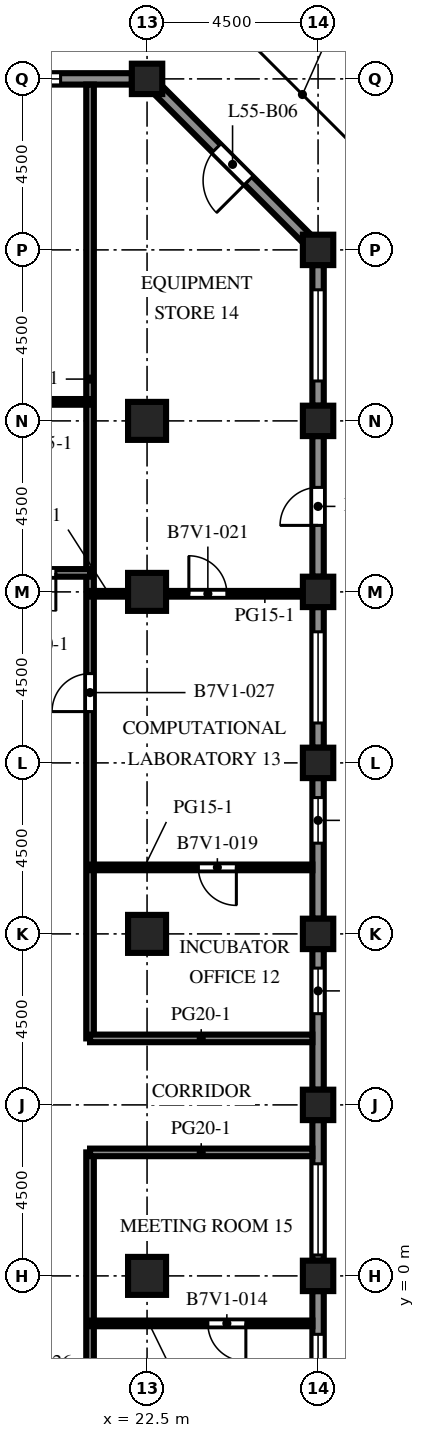
"""IFC4 building model, lengths in metres.
Left out: names, types, materials, properties, quantities, classifications, styles, units other than length and angle.
Written with IfcOpenShell. Run it as: python <this file> out.ifc"""

import sys

from ifc_helpers import new_model, si_unit, direction, frame, frame_2d, origin, origin_2d, place, context, subcontext, project, spatial, rectangle, extrude, element, fill, save


model = new_model("IFC4")
c1 = context("Model", 3, precision=1e-05, world=origin(), true_north=direction((0.0, 1.0)))
c2 = subcontext(c1, "Body", "Model", "MODEL_VIEW")
j1 = project(units=[si_unit("LENGTHUNIT", "METRE"), si_unit("PLANEANGLEUNIT", "RADIAN")], contexts=[c1])
p1 = place(None, origin())
s1 = spatial("IfcSite", under=j1, at=p1, CompositionType="ELEMENT")
p2 = place(p1, origin())
s2 = spatial("IfcBuilding", under=s1, at=p2, CompositionType="ELEMENT")
p3 = place(p2, frame((0.0, 0.0, 243.9)))
s3 = spatial("IfcBuildingStorey", under=s2, at=p3, CompositionType="ELEMENT", Elevation=243.9)
for number, where, z_axis, x_axis in (
    (1, (22.5, 31.5, 0.0), (0.0, 0.0, 1.0), (1.0, 0.0, 0.0)),
    (2, (27.0, 0.0, 0.0), (0.0, 0.0, 1.0), (1.0, 0.0, 0.0)),
    (3, (27.0, 4.5, 0.0), (0.0, 0.0, 1.0), (1.0, 0.0, 0.0)),
    (4, (27.0, 9.0, 0.0), (0.0, 0.0, 1.0), (1.0, 0.0, 0.0)),
    (5, (27.0, 13.5, 0.0), (0.0, 0.0, 1.0), (1.0, 0.0, 0.0)),
    (6, (27.0, 18.0, 0.0), (0.0, 0.0, 1.0), (1.0, 0.0, 0.0)),
    (7, (27.0, 22.5, 0.0), (0.0, 0.0, 1.0), (1.0, 0.0, 0.0)),
    (8, (27.0, 27.0, 0.0), (0.0, 0.0, 1.0), (1.0, 0.0, 0.0)),
):
    element("IfcColumn", number, at=place(p3, frame(where, z_axis=z_axis, x_axis=x_axis)), inside=s3, PredefinedType="COLUMN", context=c2, shape_type="SweptSolid", body=[
        extrude(rectangle(XDim=0.8, YDim=0.8, at=origin_2d()), origin(), (0.0, 0.0, 1.0), 4.1),
    ])
for number, where, z_axis, x_axis in (
    (9, (22.5, 0.0, 0.0), (0.0, 0.0, 1.0), (1.0, 0.0, 0.0)),
    (10, (22.5, 9.0, 0.0), (0.0, 0.0, 1.0), (1.0, 0.0, 0.0)),
    (11, (22.5, 18.0, 0.0), (0.0, 0.0, 1.0), (1.0, 0.0, 0.0)),
    (12, (22.5, 22.5, 0.0), (0.0, 0.0, 1.0), (1.0, 0.0, 0.0)),
):
    element("IfcColumn", number, at=place(p3, frame(where, z_axis=z_axis, x_axis=x_axis)), inside=s3, PredefinedType="COLUMN", context=c2, shape_type="SweptSolid", body=[
        extrude(rectangle(XDim=1.0, YDim=1.0, at=origin_2d()), origin(), (0.0, 0.0, 1.0), 4.1),
    ])
p4 = place(p3, frame((27.0, -0.4, 0.0), z_axis=(0.0, 0.0, 1.0), x_axis=(0.0, -1.0, 0.0)))
e13 = element("IfcWall", 13, at=p4, inside=s3, PredefinedType="SOLIDWALL", context=c2, shape_type="SweptSolid", body=[
    extrude(rectangle(XDim=3.7, YDim=0.3, at=frame_2d((1.85, 0.0))), origin(), (0.0, 0.0, 1.0), 2.85),
])
p5 = place(p4, frame((1.137, 0.0, 0.8)))
e14 = element("IfcOpeningElement", 14, at=p5, cuts=e13, PredefinedType="OPENING", context=c2, shape_type="SweptSolid", body=[
    extrude(rectangle(XDim=2.4, YDim=1.7, at=frame_2d((1.2, 0.85))), frame((0.0, 0.16, 0.0), z_axis=(0.0, -1.0, 0.0), x_axis=(1.0, 0.0, 0.0)), (0.0, 0.0, 1.0), 0.32),
])
p6 = place(p3, frame((27.0, 4.1, 0.0), z_axis=(0.0, 0.0, 1.0), x_axis=(0.0, -1.0, 0.0)))
e15 = element("IfcWall", 15, at=p6, inside=s3, PredefinedType="SOLIDWALL", context=c2, shape_type="SweptSolid", body=[
    extrude(rectangle(XDim=3.7, YDim=0.3, at=frame_2d((1.85, 0.0))), origin(), (0.0, 0.0, 1.0), 2.85),
])
p7 = place(p6, frame((1.15, 0.0, 0.8)))
e16 = element("IfcOpeningElement", 16, at=p7, cuts=e15, PredefinedType="OPENING", context=c2, shape_type="SweptSolid", body=[
    extrude(rectangle(XDim=2.4, YDim=1.7, at=frame_2d((1.2, 0.85))), frame((0.0, 0.16, 0.0), z_axis=(0.0, -1.0, 0.0), x_axis=(1.0, 0.0, 0.0)), (0.0, 0.0, 1.0), 0.32),
])
p8 = place(p3, frame((27.0, 8.6, 0.0), z_axis=(0.0, 0.0, 1.0), x_axis=(0.0, -1.0, 0.0)))
e17 = element("IfcWall", 17, at=p8, inside=s3, PredefinedType="SOLIDWALL", context=c2, shape_type="SweptSolid", body=[
    extrude(rectangle(XDim=3.7, YDim=0.3, at=frame_2d((1.85, 0.0))), origin(), (0.0, 0.0, 1.0), 2.85),
])
p9 = place(p8, frame((0.5, 0.0, 0.8)))
e18 = element("IfcOpeningElement", 18, at=p9, cuts=e17, PredefinedType="OPENING", context=c2, shape_type="SweptSolid", body=[
    extrude(rectangle(XDim=1.2, YDim=1.7, at=frame_2d((0.6, 0.85))), frame((0.0, 0.16, 0.0), z_axis=(0.0, -1.0, 0.0), x_axis=(1.0, 0.0, 0.0)), (0.0, 0.0, 1.0), 0.32),
])
p10 = place(p3, frame((27.0, 13.1, 0.0), z_axis=(0.0, 0.0, 1.0), x_axis=(0.0, -1.0, 0.0)))
e19 = element("IfcWall", 19, at=p10, inside=s3, PredefinedType="SOLIDWALL", context=c2, shape_type="SweptSolid", body=[
    extrude(rectangle(XDim=3.7, YDim=0.3, at=frame_2d((1.85, 0.0))), origin(), (0.0, 0.0, 1.0), 2.85),
])
p11 = place(p10, frame((0.512, 0.0, 0.8)))
e20 = element("IfcOpeningElement", 20, at=p11, cuts=e19, PredefinedType="OPENING", context=c2, shape_type="SweptSolid", body=[
    extrude(rectangle(XDim=1.2, YDim=1.7, at=frame_2d((0.6, 0.85))), frame((0.0, 0.16, 0.0), z_axis=(0.0, -1.0, 0.0), x_axis=(1.0, 0.0, 0.0)), (0.0, 0.0, 1.0), 0.32),
])
p12 = place(p3, frame((27.0, 17.6, 0.0), z_axis=(0.0, 0.0, 1.0), x_axis=(0.0, -1.0, 0.0)))
e21 = element("IfcWall", 21, at=p12, inside=s3, PredefinedType="SOLIDWALL", context=c2, shape_type="SweptSolid", body=[
    extrude(rectangle(XDim=3.7, YDim=0.3, at=frame_2d((1.85, 0.0))), origin(), (0.0, 0.0, 1.0), 2.85),
])
p13 = place(p12, frame((0.65, 0.0, 0.8)))
e22 = element("IfcOpeningElement", 22, at=p13, cuts=e21, PredefinedType="OPENING", context=c2, shape_type="SweptSolid", body=[
    extrude(rectangle(XDim=2.4, YDim=1.7, at=frame_2d((1.2, 0.85))), frame((0.0, 0.16, 0.0), z_axis=(0.0, -1.0, 0.0), x_axis=(1.0, 0.0, 0.0)), (0.0, 0.0, 1.0), 0.32),
])
p14 = place(p3, frame((27.0, 22.1, 0.0), z_axis=(0.0, 0.0, 1.0), x_axis=(0.0, -1.0, 0.0)))
e23 = element("IfcWall", 23, at=p14, inside=s3, PredefinedType="SOLIDWALL", context=c2, shape_type="SweptSolid", body=[
    extrude(rectangle(XDim=3.7, YDim=0.3, at=frame_2d((1.85, 0.0))), origin(), (0.0, 0.0, 1.0), 2.85),
])
p15 = place(p14, frame((1.35, 0.0, 0.0)))
e24 = element("IfcOpeningElement", 24, at=p15, cuts=e23, PredefinedType="OPENING", context=c2, shape_type="SweptSolid", body=[
    extrude(rectangle(XDim=1.0, YDim=2.2, at=frame_2d((0.5, 1.1))), frame((0.0, 0.16, 0.0), z_axis=(0.0, -1.0, 0.0), x_axis=(1.0, 0.0, 0.0)), (0.0, 0.0, 1.0), 0.32),
])
p16 = place(p3, frame((27.0, 26.6, 0.0), z_axis=(0.0, 0.0, 1.0), x_axis=(0.0, -1.0, 0.0)))
e25 = element("IfcWall", 25, at=p16, inside=s3, PredefinedType="SOLIDWALL", context=c2, shape_type="SweptSolid", body=[
    extrude(rectangle(XDim=3.7, YDim=0.3, at=frame_2d((1.85, 0.0))), origin(), (0.0, 0.0, 1.0), 2.85),
])
p17 = place(p16, frame((0.65, 0.0, 0.8)))
e26 = element("IfcOpeningElement", 26, at=p17, cuts=e25, PredefinedType="OPENING", context=c2, shape_type="SweptSolid", body=[
    extrude(rectangle(XDim=2.4, YDim=1.7, at=frame_2d((1.2, 0.85))), frame((0.0, 0.16, 0.0), z_axis=(0.0, -1.0, 0.0), x_axis=(1.0, 0.0, 0.0)), (0.0, 0.0, 1.0), 0.32),
])
p18 = place(p3, frame((22.794, 31.206, 0.0), z_axis=(0.0, 0.0, 1.0), x_axis=(0.707106781187, -0.707106781187, 0.0)))
e27 = element("IfcWall", 27, at=p18, inside=s3, PredefinedType="SOLIDWALL", context=c2, shape_type="SweptSolid", body=[
    extrude(rectangle(XDim=5.532, YDim=0.3, at=frame_2d((2.766, 0.0))), origin(), (0.0, 0.0, 1.0), 2.85),
])
p19 = place(p18, frame((2.166, 0.0, 0.0)))
e28 = element("IfcOpeningElement", 28, at=p19, cuts=e27, PredefinedType="OPENING", context=c2, shape_type="SweptSolid", body=[
    extrude(rectangle(XDim=1.2, YDim=2.2, at=frame_2d((0.6, 1.1))), frame((0.0, 0.16, 0.0), z_axis=(0.0, -1.0, 0.0), x_axis=(1.0, 0.0, 0.0)), (0.0, 0.0, 1.0), 0.32),
])
p20 = place(p3, frame((18.4, 31.5, 0.0), z_axis=(0.0, 0.0, 1.0), x_axis=(1.0, 0.0, 0.0)))
e29 = element("IfcWall", 29, at=p20, inside=s3, PredefinedType="SOLIDWALL", context=c2, shape_type="SweptSolid", body=[
    extrude(rectangle(XDim=3.7, YDim=0.3, at=frame_2d((1.85, 0.0))), origin(), (0.0, 0.0, 1.0), 2.85),
])
p21 = place(p20, frame((0.625, 0.0, 0.8)))
e30 = element("IfcOpeningElement", 30, at=p21, cuts=e29, PredefinedType="OPENING", context=c2, shape_type="SweptSolid", body=[
    extrude(rectangle(XDim=1.2, YDim=1.7, at=frame_2d((0.6, 0.85))), frame((0.0, 0.16, 0.0), z_axis=(0.0, -1.0, 0.0), x_axis=(1.0, 0.0, 0.0)), (0.0, 0.0, 1.0), 0.32),
])
p22 = place(p3, frame((21.0, 3.25, 0.0), z_axis=(0.0, 0.0, 1.0), x_axis=(0.0, -1.0, 0.0)))
e31 = element("IfcWall", 31, at=p22, inside=s3, PredefinedType="PARTITIONING", context=c2, shape_type="SweptSolid", body=[
    extrude(rectangle(XDim=25.6, YDim=0.2, at=frame_2d((12.8, 0.0))), origin(), (0.0, 0.0, 1.0), 3.65),
])
p23 = place(p22, frame((6.6, 0.0, 0.0)))
e32 = element("IfcOpeningElement", 32, at=p23, cuts=e31, PredefinedType="OPENING", context=c2, shape_type="SweptSolid", body=[
    extrude(rectangle(XDim=1.0, YDim=2.1, at=frame_2d((0.5, 1.05))), frame((0.0, 0.11, 0.0), z_axis=(0.0, -1.0, 0.0), x_axis=(1.0, 0.0, 0.0)), (0.0, 0.0, 1.0), 0.22),
])
p24 = place(p3, frame((21.0, 31.35, 0.0), z_axis=(0.0, 0.0, 1.0), x_axis=(0.0, -1.0, 0.0)))
e33 = element("IfcWall", 33, at=p24, inside=s3, PredefinedType="PARTITIONING", context=c2, shape_type="SweptSolid", body=[
    extrude(rectangle(XDim=25.1, YDim=0.2, at=frame_2d((12.55, 0.0))), origin(), (0.0, 0.0, 1.0), 3.65),
])
p25 = place(p24, frame((15.5, 0.0, 0.0)))
e34 = element("IfcOpeningElement", 34, at=p25, cuts=e33, PredefinedType="OPENING", context=c2, shape_type="SweptSolid", body=[
    extrude(rectangle(XDim=1.0, YDim=2.1, at=frame_2d((0.5, 1.05))), frame((0.0, 0.11, 0.0), z_axis=(0.0, -1.0, 0.0), x_axis=(1.0, 0.0, 0.0)), (0.0, 0.0, 1.0), 0.22),
])
p26 = place(p3, frame((21.0, -1.25, 0.0), z_axis=(0.0, 0.0, 1.0), x_axis=(1.0, 0.0, 0.0)))
e35 = element("IfcWall", 35, at=p26, inside=s3, PredefinedType="PARTITIONING", context=c2, shape_type="SweptSolid", body=[
    extrude(rectangle(XDim=5.85, YDim=0.15, at=frame_2d((2.925, 0.0))), origin(), (0.0, 0.0, 1.0), 3.65),
])
p27 = place(p26, frame((3.1, 0.0, 0.0)))
e36 = element("IfcOpeningElement", 36, at=p27, cuts=e35, PredefinedType="OPENING", context=c2, shape_type="SweptSolid", body=[
    extrude(rectangle(XDim=1.0, YDim=2.1, at=frame_2d((0.5, 1.05))), frame((0.0, 0.085, 0.0), z_axis=(0.0, -1.0, 0.0), x_axis=(1.0, 0.0, 0.0)), (0.0, 0.0, 1.0), 0.17),
])
for number, where, z_axis, x_axis in (
    (37, (21.0, 3.25, 0.0), (0.0, 0.0, 1.0), (1.0, 0.0, 0.0)),
    (38, (21.0, 6.25, 0.0), (0.0, 0.0, 1.0), (1.0, 0.0, 0.0)),
):
    element("IfcWall", number, at=place(p3, frame(where, z_axis=z_axis, x_axis=x_axis)), inside=s3, PredefinedType="PARTITIONING", context=c2, shape_type="SweptSolid", body=[
        extrude(rectangle(XDim=5.85, YDim=0.2, at=frame_2d((2.925, 0.0))), origin(), (0.0, 0.0, 1.0), 3.65),
    ])
p28 = place(p3, frame((26.85, 10.75, 0.0), z_axis=(0.0, 0.0, 1.0), x_axis=(-1.0, 0.0, 0.0)))
e39 = element("IfcWall", 39, at=p28, inside=s3, PredefinedType="PARTITIONING", context=c2, shape_type="SweptSolid", body=[
    extrude(rectangle(XDim=5.85, YDim=0.15, at=frame_2d((2.925, 0.0))), origin(), (0.0, 0.0, 1.0), 3.65),
])
p29 = place(p28, frame((2.0, 0.0, 0.0)))
e40 = element("IfcOpeningElement", 40, at=p29, cuts=e39, PredefinedType="OPENING", context=c2, shape_type="SweptSolid", body=[
    extrude(rectangle(XDim=1.0, YDim=2.1, at=frame_2d((0.5, 1.05))), frame((0.0, 0.085, 0.0), z_axis=(0.0, -1.0, 0.0), x_axis=(1.0, 0.0, 0.0)), (0.0, 0.0, 1.0), 0.17),
])
p30 = place(p3, frame((21.0, 17.95, 0.0), z_axis=(0.0, 0.0, 1.0), x_axis=(1.0, 0.0, 0.0)))
e41 = element("IfcWall", 41, at=p30, inside=s3, PredefinedType="PARTITIONING", context=c2, shape_type="SweptSolid", body=[
    extrude(rectangle(XDim=1.0, YDim=0.15, at=frame_2d((0.5, 0.0))), origin(), (0.0, 0.0, 1.0), 3.65),
])
p31 = place(p3, frame((23.0, 17.95, 0.0), z_axis=(0.0, 0.0, 1.0), x_axis=(1.0, 0.0, 0.0)))
e42 = element("IfcWall", 42, at=p31, inside=s3, PredefinedType="PARTITIONING", context=c2, shape_type="SweptSolid", body=[
    extrude(rectangle(XDim=3.6, YDim=0.15, at=frame_2d((1.8, 0.0))), origin(), (0.0, 0.0, 1.0), 3.65),
])
p32 = place(p31, frame((0.6, 0.0, 0.0)))
e43 = element("IfcOpeningElement", 43, at=p32, cuts=e42, PredefinedType="OPENING", context=c2, shape_type="SweptSolid", body=[
    extrude(rectangle(XDim=1.0, YDim=2.1, at=frame_2d((0.5, 1.05))), frame((0.0, 0.085, 0.0), z_axis=(0.0, -1.0, 0.0), x_axis=(1.0, 0.0, 0.0)), (0.0, 0.0, 1.0), 0.17),
])
p33 = place(p3, frame((18.0, 18.5, 0.0), z_axis=(0.0, 0.0, 1.0), x_axis=(1.0, 0.0, 0.0)))
e44 = element("IfcWall", 44, at=p33, inside=s3, PredefinedType="PARTITIONING", context=c2, shape_type="SweptSolid", body=[
    extrude(rectangle(XDim=3.0, YDim=0.2, at=frame_2d((1.5, 0.0))), origin(), (0.0, 0.0, 1.0), 3.65),
])
p34 = place(p33, frame((1.1, 0.0, 0.0)))
e45 = element("IfcOpeningElement", 45, at=p34, cuts=e44, PredefinedType="OPENING", context=c2, shape_type="SweptSolid", body=[
    extrude(rectangle(XDim=1.0, YDim=2.1, at=frame_2d((0.5, 1.05))), frame((0.0, 0.11, 0.0), z_axis=(0.0, -1.0, 0.0), x_axis=(1.0, 0.0, 0.0)), (0.0, 0.0, 1.0), 0.22),
])
p35 = place(p3, frame((18.5, 23.0, 0.0), z_axis=(0.0, 0.0, 1.0), x_axis=(1.0, 0.0, 0.0)))
e46 = element("IfcWall", 46, at=p35, inside=s3, PredefinedType="PARTITIONING", context=c2, shape_type="SweptSolid", body=[
    extrude(rectangle(XDim=2.5, YDim=0.15, at=frame_2d((1.25, 0.0))), origin(), (0.0, 0.0, 1.0), 3.65),
])
p36 = place(p5, origin())
e47 = element("IfcWindow", 47, at=p36, inside=s3, PartitioningType="SINGLE_PANEL", PredefinedType="WINDOW", context=c2, shape_type="SweptSolid", body=[
    extrude(rectangle(XDim=2.4, YDim=1.7, at=frame_2d((1.2, 0.85))), frame((0.0, 0.03, 0.0), z_axis=(0.0, -1.0, 0.0), x_axis=(1.0, 0.0, 0.0)), (0.0, 0.0, 1.0), 0.06),
])
fill(e14, e47)
p37 = place(p7, origin())
e48 = element("IfcWindow", 48, at=p37, inside=s3, PartitioningType="SINGLE_PANEL", PredefinedType="WINDOW", context=c2, shape_type="SweptSolid", body=[
    extrude(rectangle(XDim=2.4, YDim=1.7, at=frame_2d((1.2, 0.85))), frame((0.0, 0.03, 0.0), z_axis=(0.0, -1.0, 0.0), x_axis=(1.0, 0.0, 0.0)), (0.0, 0.0, 1.0), 0.06),
])
fill(e16, e48)
p38 = place(p9, origin())
e49 = element("IfcWindow", 49, at=p38, inside=s3, PartitioningType="SINGLE_PANEL", PredefinedType="WINDOW", context=c2, shape_type="SweptSolid", body=[
    extrude(rectangle(XDim=1.2, YDim=1.7, at=frame_2d((0.6, 0.85))), frame((0.0, 0.03, 0.0), z_axis=(0.0, -1.0, 0.0), x_axis=(1.0, 0.0, 0.0)), (0.0, 0.0, 1.0), 0.06),
])
fill(e18, e49)
p39 = place(p11, origin())
e50 = element("IfcWindow", 50, at=p39, inside=s3, PartitioningType="SINGLE_PANEL", PredefinedType="WINDOW", context=c2, shape_type="SweptSolid", body=[
    extrude(rectangle(XDim=1.2, YDim=1.7, at=frame_2d((0.6, 0.85))), frame((0.0, 0.03, 0.0), z_axis=(0.0, -1.0, 0.0), x_axis=(1.0, 0.0, 0.0)), (0.0, 0.0, 1.0), 0.06),
])
fill(e20, e50)
p40 = place(p13, origin())
e51 = element("IfcWindow", 51, at=p40, inside=s3, PartitioningType="SINGLE_PANEL", PredefinedType="WINDOW", context=c2, shape_type="SweptSolid", body=[
    extrude(rectangle(XDim=2.4, YDim=1.7, at=frame_2d((1.2, 0.85))), frame((0.0, 0.03, 0.0), z_axis=(0.0, -1.0, 0.0), x_axis=(1.0, 0.0, 0.0)), (0.0, 0.0, 1.0), 0.06),
])
fill(e22, e51)
p41 = place(p15, origin())
e52 = element("IfcDoor", 52, at=p41, inside=s3, OperationType="SINGLE_SWING_RIGHT", PredefinedType="DOOR", context=c2, shape_type="SweptSolid", body=[
    extrude(rectangle(XDim=1.0, YDim=2.2, at=frame_2d((0.5, 1.1))), frame((0.0, 0.025, 0.0), z_axis=(0.0, -1.0, 0.0), x_axis=(1.0, 0.0, 0.0)), (0.0, 0.0, 1.0), 0.05),
])
fill(e24, e52)
p42 = place(p17, origin())
e53 = element("IfcWindow", 53, at=p42, inside=s3, PartitioningType="SINGLE_PANEL", PredefinedType="WINDOW", context=c2, shape_type="SweptSolid", body=[
    extrude(rectangle(XDim=2.4, YDim=1.7, at=frame_2d((1.2, 0.85))), frame((0.0, 0.03, 0.0), z_axis=(0.0, -1.0, 0.0), x_axis=(1.0, 0.0, 0.0)), (0.0, 0.0, 1.0), 0.06),
])
fill(e26, e53)
p43 = place(p19, origin())
e54 = element("IfcDoor", 54, at=p43, inside=s3, OperationType="SINGLE_SWING_RIGHT", PredefinedType="DOOR", context=c2, shape_type="SweptSolid", body=[
    extrude(rectangle(XDim=1.2, YDim=2.2, at=frame_2d((0.6, 1.1))), frame((0.0, 0.025, 0.0), z_axis=(0.0, -1.0, 0.0), x_axis=(1.0, 0.0, 0.0)), (0.0, 0.0, 1.0), 0.05),
])
fill(e28, e54)
p44 = place(p21, origin())
e55 = element("IfcWindow", 55, at=p44, inside=s3, PartitioningType="SINGLE_PANEL", PredefinedType="WINDOW", context=c2, shape_type="SweptSolid", body=[
    extrude(rectangle(XDim=1.2, YDim=1.7, at=frame_2d((0.6, 0.85))), frame((0.0, 0.03, 0.0), z_axis=(0.0, -1.0, 0.0), x_axis=(1.0, 0.0, 0.0)), (0.0, 0.0, 1.0), 0.06),
])
fill(e30, e55)
p45 = place(p27, origin())
e56 = element("IfcDoor", 56, at=p45, inside=s3, OperationType="SINGLE_SWING_RIGHT", PredefinedType="DOOR", context=c2, shape_type="SweptSolid", body=[
    extrude(rectangle(XDim=1.0, YDim=2.1, at=frame_2d((0.5, 1.05))), frame((0.0, 0.025, 0.0), z_axis=(0.0, -1.0, 0.0), x_axis=(1.0, 0.0, 0.0)), (0.0, 0.0, 1.0), 0.05),
])
fill(e36, e56)
p46 = place(p29, origin())
e57 = element("IfcDoor", 57, at=p46, inside=s3, OperationType="SINGLE_SWING_LEFT", PredefinedType="DOOR", context=c2, shape_type="SweptSolid", body=[
    extrude(rectangle(XDim=1.0, YDim=2.1, at=frame_2d((0.5, 1.05))), frame((0.0, 0.025, 0.0), z_axis=(0.0, -1.0, 0.0), x_axis=(1.0, 0.0, 0.0)), (0.0, 0.0, 1.0), 0.05),
])
fill(e40, e57)
p47 = place(p32, origin())
e58 = element("IfcDoor", 58, at=p47, inside=s3, OperationType="SINGLE_SWING_LEFT", PredefinedType="DOOR", context=c2, shape_type="SweptSolid", body=[
    extrude(rectangle(XDim=1.0, YDim=2.1, at=frame_2d((0.5, 1.05))), frame((0.0, 0.025, 0.0), z_axis=(0.0, -1.0, 0.0), x_axis=(1.0, 0.0, 0.0)), (0.0, 0.0, 1.0), 0.05),
])
fill(e43, e58)
p48 = place(p34, origin())
e59 = element("IfcDoor", 59, at=p48, inside=s3, OperationType="SINGLE_SWING_RIGHT", PredefinedType="DOOR", context=c2, shape_type="SweptSolid", body=[
    extrude(rectangle(XDim=1.0, YDim=2.1, at=frame_2d((0.5, 1.05))), frame((0.0, 0.025, 0.0), z_axis=(0.0, -1.0, 0.0), x_axis=(1.0, 0.0, 0.0)), (0.0, 0.0, 1.0), 0.05),
])
fill(e45, e59)
p49 = place(p25, origin())
e60 = element("IfcDoor", 60, at=p49, inside=s3, OperationType="SINGLE_SWING_RIGHT", PredefinedType="DOOR", context=c2, shape_type="SweptSolid", body=[
    extrude(rectangle(XDim=1.0, YDim=2.1, at=frame_2d((0.5, 1.05))), frame((0.0, 0.025, 0.0), z_axis=(0.0, -1.0, 0.0), x_axis=(1.0, 0.0, 0.0)), (0.0, 0.0, 1.0), 0.05),
])
fill(e34, e60)
save(model, sys.argv[1])
